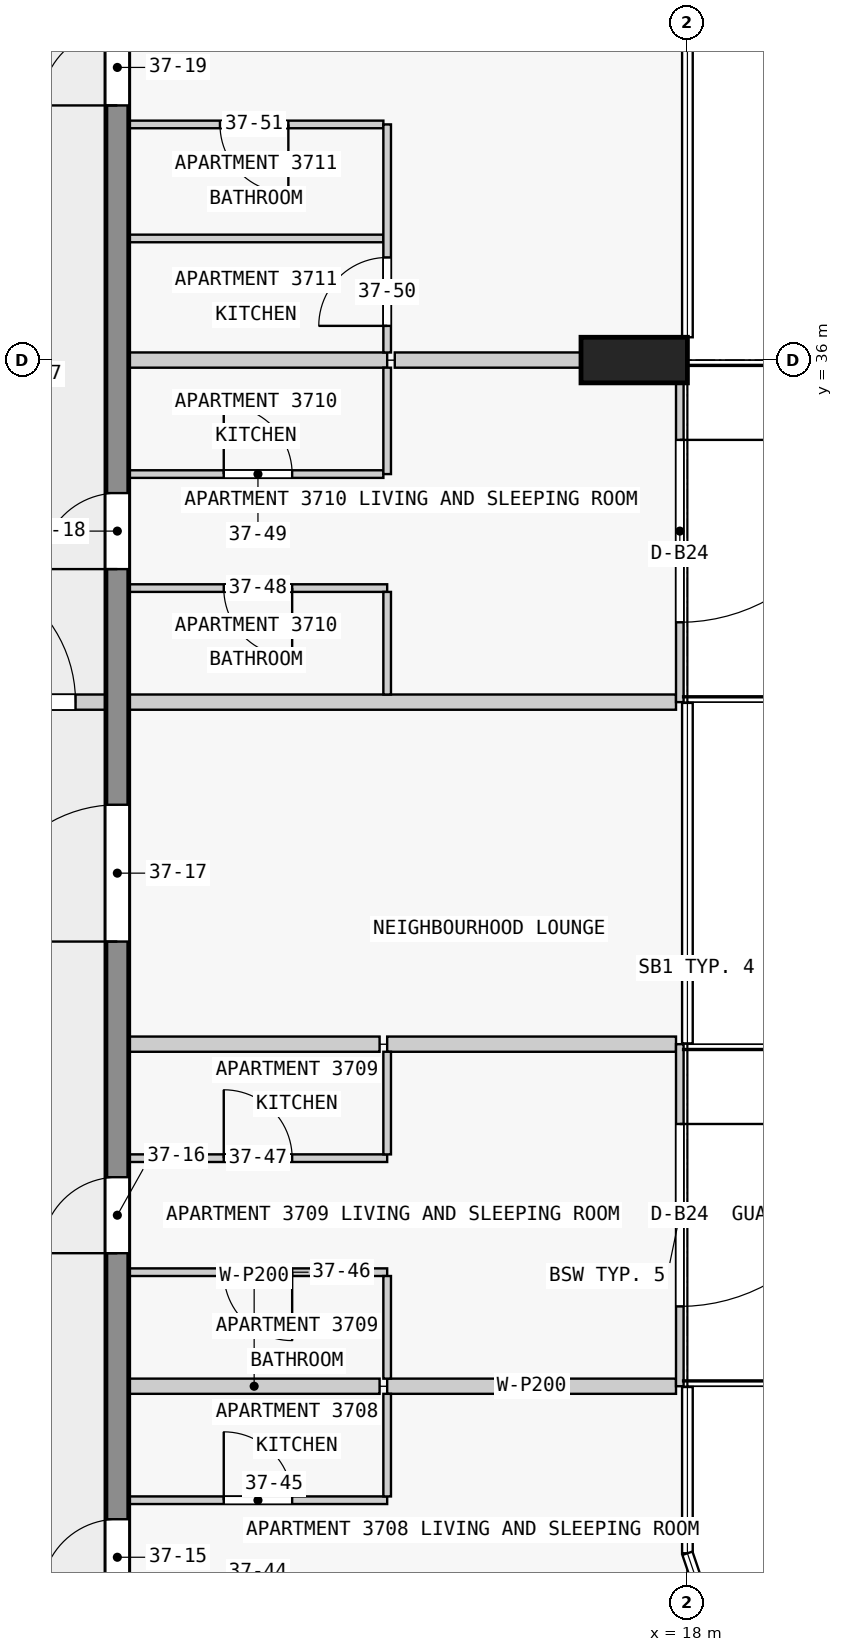
"""IFC4 building model, lengths in metres.
Left out: names, types, materials, properties, quantities, classifications, styles, units other than length and angle.
Written with IfcOpenShell. Run it as: python <this file> out.ifc"""

import sys

from ifc_helpers import new_model, si_unit, direction, frame, frame_2d, origin, origin_2d, place, context, subcontext, project, spatial, rectangle, extrude, element, fill, save


model = new_model("IFC4")
c1 = context("Model", 3, precision=1e-05, world=origin(), true_north=direction((0.0, 1.0)))
c2 = subcontext(c1, "Body", "Model", "MODEL_VIEW")
j1 = project(units=[si_unit("LENGTHUNIT", "METRE"), si_unit("PLANEANGLEUNIT", "RADIAN")], contexts=[c1])
p1 = place(None, origin())
s1 = spatial("IfcSite", under=j1, at=p1, CompositionType="ELEMENT")
p2 = place(p1, origin())
s2 = spatial("IfcBuilding", under=s1, at=p2, CompositionType="ELEMENT")
p3 = place(p2, frame((0.0, 0.0, 146.4)))
s3 = spatial("IfcBuildingStorey", under=s2, at=p3, CompositionType="ELEMENT", Elevation=146.4)
p4 = place(p3, frame((17.3, 36.0, 0.0), z_axis=(0.0, 0.0, 1.0), x_axis=(0.0, 1.0, 0.0)))
e1 = element("IfcColumn", 1, at=p4, inside=s3, PredefinedType="COLUMN", context=c2, shape_type="SweptSolid", body=[
    extrude(rectangle(XDim=0.6, YDim=1.4, at=origin_2d()), origin(), (0.0, 0.0, 1.0), 3.5),
])
p5 = place(p3, frame((10.5, 18.0, 0.0), z_axis=(0.0, 0.0, 1.0), x_axis=(0.0, 1.0, 0.0)))
e2 = element("IfcWall", 2, at=p5, inside=s3, PredefinedType="SHEAR", context=c2, shape_type="SweptSolid", body=[
    extrude(rectangle(XDim=27.0, YDim=0.3, at=frame_2d((13.5, 0.0))), origin(), (0.0, 0.0, 1.0), 3.25),
])
p6 = place(p5, frame((1.75, 0.0, 0.0)))
e3 = element("IfcOpeningElement", 3, at=p6, cuts=e2, PredefinedType="OPENING", context=c2, shape_type="SweptSolid", body=[
    extrude(rectangle(XDim=1.0, YDim=2.1, at=frame_2d((0.5, 1.05))), frame((0.0, 0.16, 0.0), z_axis=(0.0, -1.0, 0.0), x_axis=(1.0, 0.0, 0.0)), (0.0, 0.0, 1.0), 0.32),
])
p7 = place(p5, frame((6.25, 0.0, 0.0)))
e4 = element("IfcOpeningElement", 4, at=p7, cuts=e2, PredefinedType="OPENING", context=c2, shape_type="SweptSolid", body=[
    extrude(rectangle(XDim=1.0, YDim=2.1, at=frame_2d((0.5, 1.05))), frame((0.0, 0.16, 0.0), z_axis=(0.0, -1.0, 0.0), x_axis=(1.0, 0.0, 0.0)), (0.0, 0.0, 1.0), 0.32),
])
p8 = place(p5, frame((10.35, 0.0, 0.0)))
e5 = element("IfcOpeningElement", 5, at=p8, cuts=e2, PredefinedType="OPENING", context=c2, shape_type="SweptSolid", body=[
    extrude(rectangle(XDim=1.8, YDim=2.1, at=frame_2d((0.9, 1.05))), frame((0.0, 0.16, 0.0), z_axis=(0.0, -1.0, 0.0), x_axis=(1.0, 0.0, 0.0)), (0.0, 0.0, 1.0), 0.32),
])
p9 = place(p5, frame((15.25, 0.0, 0.0)))
e6 = element("IfcOpeningElement", 6, at=p9, cuts=e2, PredefinedType="OPENING", context=c2, shape_type="SweptSolid", body=[
    extrude(rectangle(XDim=1.0, YDim=2.1, at=frame_2d((0.5, 1.05))), frame((0.0, 0.16, 0.0), z_axis=(0.0, -1.0, 0.0), x_axis=(1.0, 0.0, 0.0)), (0.0, 0.0, 1.0), 0.32),
])
p10 = place(p5, frame((21.35, 0.0, 0.0)))
e7 = element("IfcOpeningElement", 7, at=p10, cuts=e2, PredefinedType="OPENING", context=c2, shape_type="SweptSolid", body=[
    extrude(rectangle(XDim=1.0, YDim=2.1, at=frame_2d((0.5, 1.05))), frame((0.0, 0.16, 0.0), z_axis=(0.0, -1.0, 0.0), x_axis=(1.0, 0.0, 0.0)), (0.0, 0.0, 1.0), 0.32),
])
p11 = place(p3, frame((17.9, 27.0, 0.0), z_axis=(0.0, 0.0, 1.0), x_axis=(0.0, -1.0, 0.0)))
e8 = element("IfcWall", 8, at=p11, inside=s3, PredefinedType="STANDARD", context=c2, shape_type="SweptSolid", body=[
    extrude(rectangle(XDim=4.5, YDim=0.1, at=frame_2d((2.25, 0.0))), origin(), (0.0, 0.0, 1.0), 3.25),
])
p12 = place(p11, frame((1.05, 0.0, 0.0)))
e9 = element("IfcOpeningElement", 9, at=p12, cuts=e8, PredefinedType="OPENING", context=c2, shape_type="SweptSolid", body=[
    extrude(rectangle(XDim=2.4, YDim=2.4, at=frame_2d((1.2, 1.2))), frame((0.0, 0.06, 0.0), z_axis=(0.0, -1.0, 0.0), x_axis=(1.0, 0.0, 0.0)), (0.0, 0.0, 1.0), 0.12),
])
p13 = place(p3, frame((17.9, 36.0, 0.0), z_axis=(0.0, 0.0, 1.0), x_axis=(0.0, -1.0, 0.0)))
e10 = element("IfcWall", 10, at=p13, inside=s3, PredefinedType="STANDARD", context=c2, shape_type="SweptSolid", body=[
    extrude(rectangle(XDim=4.5, YDim=0.1, at=frame_2d((2.25, 0.0))), origin(), (0.0, 0.0, 1.0), 3.25),
])
p14 = place(p13, frame((1.05, 0.0, 0.0)))
e11 = element("IfcOpeningElement", 11, at=p14, cuts=e10, PredefinedType="OPENING", context=c2, shape_type="SweptSolid", body=[
    extrude(rectangle(XDim=2.4, YDim=2.4, at=frame_2d((1.2, 1.2))), frame((0.0, 0.06, 0.0), z_axis=(0.0, -1.0, 0.0), x_axis=(1.0, 0.0, 0.0)), (0.0, 0.0, 1.0), 0.12),
])
p15 = place(p3, frame((10.65, 21.0, 0.0), z_axis=(0.0, 0.0, 1.0), x_axis=(1.0, 0.0, 0.0)))
e12 = element("IfcWall", 12, at=p15, inside=s3, PredefinedType="PARTITIONING", context=c2, shape_type="SweptSolid", body=[
    extrude(rectangle(XDim=3.4, YDim=0.1, at=frame_2d((1.7, 0.0))), origin(), (0.0, 0.0, 1.0), 3.25),
])
p16 = place(p15, frame((1.25, 0.0, 0.0)))
e13 = element("IfcOpeningElement", 13, at=p16, cuts=e12, PredefinedType="OPENING", context=c2, shape_type="SweptSolid", body=[
    extrude(rectangle(XDim=0.9, YDim=2.1, at=frame_2d((0.45, 1.05))), frame((0.0, 0.06, 0.0), z_axis=(0.0, -1.0, 0.0), x_axis=(1.0, 0.0, 0.0)), (0.0, 0.0, 1.0), 0.12),
])
p17 = place(p3, frame((13.95, 22.5, 0.0), z_axis=(0.0, 0.0, 1.0), x_axis=(-1.0, 0.0, 0.0)))
e14 = element("IfcWall", 14, at=p17, inside=s3, PredefinedType="PARTITIONING", context=c2, shape_type="SweptSolid", body=[
    extrude(rectangle(XDim=3.3, YDim=0.2, at=frame_2d((1.65, 0.0))), origin(), (0.0, 0.0, 1.0), 3.25),
])
p18 = place(p3, frame((14.05, 22.5, 0.0), z_axis=(0.0, 0.0, 1.0), x_axis=(1.0, 0.0, 0.0)))
e15 = element("IfcWall", 15, at=p18, inside=s3, PredefinedType="PARTITIONING", context=c2, shape_type="SweptSolid", body=[
    extrude(rectangle(XDim=3.8, YDim=0.2, at=frame_2d((1.9, 0.0))), origin(), (0.0, 0.0, 1.0), 3.25),
])
p19 = place(p3, frame((14.05, 24.0, 0.0), z_axis=(0.0, 0.0, 1.0), x_axis=(-1.0, 0.0, 0.0)))
e16 = element("IfcWall", 16, at=p19, inside=s3, PredefinedType="PARTITIONING", context=c2, shape_type="SweptSolid", body=[
    extrude(rectangle(XDim=3.4, YDim=0.1, at=frame_2d((1.7, 0.0))), origin(), (0.0, 0.0, 1.0), 3.25),
])
p20 = place(p19, frame((1.25, 0.0, 0.0)))
e17 = element("IfcOpeningElement", 17, at=p20, cuts=e16, PredefinedType="OPENING", context=c2, shape_type="SweptSolid", body=[
    extrude(rectangle(XDim=0.9, YDim=2.1, at=frame_2d((0.45, 1.05))), frame((0.0, 0.06, 0.0), z_axis=(0.0, -1.0, 0.0), x_axis=(1.0, 0.0, 0.0)), (0.0, 0.0, 1.0), 0.12),
])
p21 = place(p3, frame((10.65, 25.5, 0.0), z_axis=(0.0, 0.0, 1.0), x_axis=(1.0, 0.0, 0.0)))
e18 = element("IfcWall", 18, at=p21, inside=s3, PredefinedType="PARTITIONING", context=c2, shape_type="SweptSolid", body=[
    extrude(rectangle(XDim=3.4, YDim=0.1, at=frame_2d((1.7, 0.0))), origin(), (0.0, 0.0, 1.0), 3.25),
])
p22 = place(p21, frame((1.25, 0.0, 0.0)))
e19 = element("IfcOpeningElement", 19, at=p22, cuts=e18, PredefinedType="OPENING", context=c2, shape_type="SweptSolid", body=[
    extrude(rectangle(XDim=0.9, YDim=2.1, at=frame_2d((0.45, 1.05))), frame((0.0, 0.06, 0.0), z_axis=(0.0, -1.0, 0.0), x_axis=(1.0, 0.0, 0.0)), (0.0, 0.0, 1.0), 0.12),
])
p23 = place(p3, frame((13.95, 27.0, 0.0), z_axis=(0.0, 0.0, 1.0), x_axis=(-1.0, 0.0, 0.0)))
e20 = element("IfcWall", 20, at=p23, inside=s3, PredefinedType="PARTITIONING", context=c2, shape_type="SweptSolid", body=[
    extrude(rectangle(XDim=3.3, YDim=0.2, at=frame_2d((1.65, 0.0))), origin(), (0.0, 0.0, 1.0), 3.25),
])
p24 = place(p3, frame((14.05, 27.0, 0.0), z_axis=(0.0, 0.0, 1.0), x_axis=(1.0, 0.0, 0.0)))
e21 = element("IfcWall", 21, at=p24, inside=s3, PredefinedType="PARTITIONING", context=c2, shape_type="SweptSolid", body=[
    extrude(rectangle(XDim=3.8, YDim=0.2, at=frame_2d((1.9, 0.0))), origin(), (0.0, 0.0, 1.0), 3.25),
])
p25 = place(p3, frame((17.85, 31.5, 0.0), z_axis=(0.0, 0.0, 1.0), x_axis=(-1.0, 0.0, 0.0)))
e22 = element("IfcWall", 22, at=p25, inside=s3, PredefinedType="PARTITIONING", context=c2, shape_type="SweptSolid", body=[
    extrude(rectangle(XDim=7.2, YDim=0.2, at=frame_2d((3.6, 0.0))), origin(), (0.0, 0.0, 1.0), 3.25),
])
p26 = place(p3, frame((14.05, 33.0, 0.0), z_axis=(0.0, 0.0, 1.0), x_axis=(-1.0, 0.0, 0.0)))
e23 = element("IfcWall", 23, at=p26, inside=s3, PredefinedType="PARTITIONING", context=c2, shape_type="SweptSolid", body=[
    extrude(rectangle(XDim=3.4, YDim=0.1, at=frame_2d((1.7, 0.0))), origin(), (0.0, 0.0, 1.0), 3.25),
])
p27 = place(p26, frame((1.25, 0.0, 0.0)))
e24 = element("IfcOpeningElement", 24, at=p27, cuts=e23, PredefinedType="OPENING", context=c2, shape_type="SweptSolid", body=[
    extrude(rectangle(XDim=0.9, YDim=2.1, at=frame_2d((0.45, 1.05))), frame((0.0, 0.06, 0.0), z_axis=(0.0, -1.0, 0.0), x_axis=(1.0, 0.0, 0.0)), (0.0, 0.0, 1.0), 0.12),
])
p28 = place(p3, frame((10.65, 34.5, 0.0), z_axis=(0.0, 0.0, 1.0), x_axis=(1.0, 0.0, 0.0)))
e25 = element("IfcWall", 25, at=p28, inside=s3, PredefinedType="PARTITIONING", context=c2, shape_type="SweptSolid", body=[
    extrude(rectangle(XDim=3.35, YDim=0.1, at=frame_2d((1.675, 0.0))), origin(), (0.0, 0.0, 1.0), 3.25),
])
p29 = place(p28, frame((1.25, 0.0, 0.0)))
e26 = element("IfcOpeningElement", 26, at=p29, cuts=e25, PredefinedType="OPENING", context=c2, shape_type="SweptSolid", body=[
    extrude(rectangle(XDim=0.9, YDim=2.1, at=frame_2d((0.45, 1.05))), frame((0.0, 0.06, 0.0), z_axis=(0.0, -1.0, 0.0), x_axis=(1.0, 0.0, 0.0)), (0.0, 0.0, 1.0), 0.12),
])
p30 = place(p3, frame((14.05, 36.0, 0.0), z_axis=(0.0, 0.0, 1.0), x_axis=(-1.0, 0.0, 0.0)))
e27 = element("IfcWall", 27, at=p30, inside=s3, PredefinedType="PARTITIONING", context=c2, shape_type="SweptSolid", body=[
    extrude(rectangle(XDim=3.4, YDim=0.2, at=frame_2d((1.7, 0.0))), origin(), (0.0, 0.0, 1.0), 3.25),
])
p31 = place(p3, frame((14.15, 36.0, 0.0), z_axis=(0.0, 0.0, 1.0), x_axis=(1.0, 0.0, 0.0)))
e28 = element("IfcWall", 28, at=p31, inside=s3, PredefinedType="PARTITIONING", context=c2, shape_type="SweptSolid", body=[
    extrude(rectangle(XDim=2.45, YDim=0.2, at=frame_2d((1.225, 0.0))), origin(), (0.0, 0.0, 1.0), 3.25),
])
p32 = place(p3, frame((14.0, 37.6, 0.0), z_axis=(0.0, 0.0, 1.0), x_axis=(-1.0, 0.0, 0.0)))
e29 = element("IfcWall", 29, at=p32, inside=s3, PredefinedType="PARTITIONING", context=c2, shape_type="SweptSolid", body=[
    extrude(rectangle(XDim=3.35, YDim=0.1, at=frame_2d((1.675, 0.0))), origin(), (0.0, 0.0, 1.0), 3.25),
])
p33 = place(p3, frame((14.0, 39.1, 0.0), z_axis=(0.0, 0.0, 1.0), x_axis=(-1.0, 0.0, 0.0)))
e30 = element("IfcWall", 30, at=p33, inside=s3, PredefinedType="PARTITIONING", context=c2, shape_type="SweptSolid", body=[
    extrude(rectangle(XDim=3.35, YDim=0.1, at=frame_2d((1.675, 0.0))), origin(), (0.0, 0.0, 1.0), 3.25),
])
p34 = place(p33, frame((1.25, 0.0, 0.0)))
e31 = element("IfcOpeningElement", 31, at=p34, cuts=e30, PredefinedType="OPENING", context=c2, shape_type="SweptSolid", body=[
    extrude(rectangle(XDim=0.9, YDim=2.1, at=frame_2d((0.45, 1.05))), frame((0.0, 0.06, 0.0), z_axis=(0.0, -1.0, 0.0), x_axis=(1.0, 0.0, 0.0)), (0.0, 0.0, 1.0), 0.12),
])
for number, where, z_axis, x_axis in (
    (32, (14.05, 21.05, 0.0), (0.0, 0.0, 1.0), (0.0, 1.0, 0.0)),
    (33, (14.05, 22.6, 0.0), (0.0, 0.0, 1.0), (0.0, 1.0, 0.0)),
    (34, (14.05, 25.55, 0.0), (0.0, 0.0, 1.0), (0.0, 1.0, 0.0)),
    (35, (14.05, 31.6, 0.0), (0.0, 0.0, 1.0), (0.0, 1.0, 0.0)),
):
    element("IfcWall", number, at=place(p3, frame(where, z_axis=z_axis, x_axis=x_axis)), inside=s3, PredefinedType="PARTITIONING", context=c2, shape_type="SweptSolid", body=[
        extrude(rectangle(XDim=1.35, YDim=0.1, at=frame_2d((0.675, 0.0))), origin(), (0.0, 0.0, 1.0), 3.25),
    ])
p35 = place(p3, frame((14.05, 34.5, 0.0), z_axis=(0.0, 0.0, 1.0), x_axis=(0.0, 1.0, 0.0)))
e36 = element("IfcWall", 36, at=p35, inside=s3, PredefinedType="PARTITIONING", context=c2, shape_type="SweptSolid", body=[
    extrude(rectangle(XDim=1.4, YDim=0.1, at=frame_2d((0.7, 0.0))), origin(), (0.0, 0.0, 1.0), 3.25),
])
p36 = place(p3, frame((14.05, 36.1, 0.0), z_axis=(0.0, 0.0, 1.0), x_axis=(0.0, 1.0, 0.0)))
e37 = element("IfcWall", 37, at=p36, inside=s3, PredefinedType="PARTITIONING", context=c2, shape_type="SweptSolid", body=[
    extrude(rectangle(XDim=3.0, YDim=0.1, at=frame_2d((1.5, 0.0))), origin(), (0.0, 0.0, 1.0), 3.25),
])
p37 = place(p36, frame((0.35, 0.0, 0.0)))
e38 = element("IfcOpeningElement", 38, at=p37, cuts=e37, PredefinedType="OPENING", context=c2, shape_type="SweptSolid", body=[
    extrude(rectangle(XDim=0.9, YDim=2.1, at=frame_2d((0.45, 1.05))), frame((0.0, 0.06, 0.0), z_axis=(0.0, -1.0, 0.0), x_axis=(1.0, 0.0, 0.0)), (0.0, 0.0, 1.0), 0.12),
])
p38 = place(p3, frame((7.45, 31.5, 0.0), z_axis=(0.0, 0.0, 1.0), x_axis=(1.0, 0.0, 0.0)))
e39 = element("IfcWall", 39, at=p38, inside=s3, PredefinedType="PARTITIONING", context=c2, shape_type="SweptSolid", body=[
    extrude(rectangle(XDim=3.1, YDim=0.2, at=frame_2d((1.55, 0.0))), origin(), (0.0, 0.0, 1.0), 3.25),
])
p39 = place(p38, frame((0.7, 0.0, 0.0)))
e40 = element("IfcOpeningElement", 40, at=p39, cuts=e39, PredefinedType="OPENING", context=c2, shape_type="SweptSolid", body=[
    extrude(rectangle(XDim=1.8, YDim=2.1, at=frame_2d((0.9, 1.05))), frame((0.0, 0.11, 0.0), z_axis=(0.0, -1.0, 0.0), x_axis=(1.0, 0.0, 0.0)), (0.0, 0.0, 1.0), 0.22),
])
p40 = place(p12, origin())
e41 = element("IfcDoor", 41, at=p40, inside=s3, OperationType="SINGLE_SWING_LEFT", PredefinedType="DOOR", context=c2, shape_type="SweptSolid", body=[
    extrude(rectangle(XDim=2.4, YDim=2.4, at=frame_2d((1.2, 1.2))), frame((0.0, 0.025, 0.0), z_axis=(0.0, -1.0, 0.0), x_axis=(1.0, 0.0, 0.0)), (0.0, 0.0, 1.0), 0.05),
])
fill(e9, e41)
p41 = place(p14, origin())
e42 = element("IfcDoor", 42, at=p41, inside=s3, OperationType="SINGLE_SWING_LEFT", PredefinedType="DOOR", context=c2, shape_type="SweptSolid", body=[
    extrude(rectangle(XDim=2.4, YDim=2.4, at=frame_2d((1.2, 1.2))), frame((0.0, 0.025, 0.0), z_axis=(0.0, -1.0, 0.0), x_axis=(1.0, 0.0, 0.0)), (0.0, 0.0, 1.0), 0.05),
])
fill(e11, e42)
p42 = place(p6, origin())
e43 = element("IfcDoor", 43, at=p42, inside=s3, OperationType="SINGLE_SWING_LEFT", PredefinedType="DOOR", context=c2, shape_type="SweptSolid", body=[
    extrude(rectangle(XDim=1.0, YDim=2.1, at=frame_2d((0.5, 1.05))), frame((0.0, 0.025, 0.0), z_axis=(0.0, -1.0, 0.0), x_axis=(1.0, 0.0, 0.0)), (0.0, 0.0, 1.0), 0.05),
])
fill(e3, e43)
p43 = place(p7, origin())
e44 = element("IfcDoor", 44, at=p43, inside=s3, OperationType="SINGLE_SWING_LEFT", PredefinedType="DOOR", context=c2, shape_type="SweptSolid", body=[
    extrude(rectangle(XDim=1.0, YDim=2.1, at=frame_2d((0.5, 1.05))), frame((0.0, 0.025, 0.0), z_axis=(0.0, -1.0, 0.0), x_axis=(1.0, 0.0, 0.0)), (0.0, 0.0, 1.0), 0.05),
])
fill(e4, e44)
p44 = place(p8, origin())
e45 = element("IfcDoor", 45, at=p44, inside=s3, OperationType="SINGLE_SWING_LEFT", PredefinedType="DOOR", context=c2, shape_type="SweptSolid", body=[
    extrude(rectangle(XDim=1.8, YDim=2.1, at=frame_2d((0.9, 1.05))), frame((0.0, 0.025, 0.0), z_axis=(0.0, -1.0, 0.0), x_axis=(1.0, 0.0, 0.0)), (0.0, 0.0, 1.0), 0.05),
])
fill(e5, e45)
p45 = place(p9, origin())
e46 = element("IfcDoor", 46, at=p45, inside=s3, OperationType="SINGLE_SWING_RIGHT", PredefinedType="DOOR", context=c2, shape_type="SweptSolid", body=[
    extrude(rectangle(XDim=1.0, YDim=2.1, at=frame_2d((0.5, 1.05))), frame((0.0, 0.025, 0.0), z_axis=(0.0, -1.0, 0.0), x_axis=(1.0, 0.0, 0.0)), (0.0, 0.0, 1.0), 0.05),
])
fill(e6, e46)
p46 = place(p10, origin())
e47 = element("IfcDoor", 47, at=p46, inside=s3, OperationType="SINGLE_SWING_RIGHT", PredefinedType="DOOR", context=c2, shape_type="SweptSolid", body=[
    extrude(rectangle(XDim=1.0, YDim=2.1, at=frame_2d((0.5, 1.05))), frame((0.0, 0.025, 0.0), z_axis=(0.0, -1.0, 0.0), x_axis=(1.0, 0.0, 0.0)), (0.0, 0.0, 1.0), 0.05),
])
fill(e7, e47)
p47 = place(p39, origin())
e48 = element("IfcDoor", 48, at=p47, inside=s3, OperationType="SINGLE_SWING_RIGHT", PredefinedType="DOOR", context=c2, shape_type="SweptSolid", body=[
    extrude(rectangle(XDim=1.8, YDim=2.1, at=frame_2d((0.9, 1.05))), frame((0.0, 0.025, 0.0), z_axis=(0.0, -1.0, 0.0), x_axis=(1.0, 0.0, 0.0)), (0.0, 0.0, 1.0), 0.05),
])
fill(e40, e48)
p48 = place(p16, origin())
e49 = element("IfcDoor", 49, at=p48, inside=s3, OperationType="SINGLE_SWING_LEFT", PredefinedType="DOOR", context=c2, shape_type="SweptSolid", body=[
    extrude(rectangle(XDim=0.9, YDim=2.1, at=frame_2d((0.45, 1.05))), frame((0.0, 0.025, 0.0), z_axis=(0.0, -1.0, 0.0), x_axis=(1.0, 0.0, 0.0)), (0.0, 0.0, 1.0), 0.05),
])
fill(e13, e49)
p49 = place(p20, origin())
e50 = element("IfcDoor", 50, at=p49, inside=s3, OperationType="SINGLE_SWING_LEFT", PredefinedType="DOOR", context=c2, shape_type="SweptSolid", body=[
    extrude(rectangle(XDim=0.9, YDim=2.1, at=frame_2d((0.45, 1.05))), frame((0.0, 0.025, 0.0), z_axis=(0.0, -1.0, 0.0), x_axis=(1.0, 0.0, 0.0)), (0.0, 0.0, 1.0), 0.05),
])
fill(e17, e50)
p50 = place(p22, origin())
e51 = element("IfcDoor", 51, at=p50, inside=s3, OperationType="SINGLE_SWING_LEFT", PredefinedType="DOOR", context=c2, shape_type="SweptSolid", body=[
    extrude(rectangle(XDim=0.9, YDim=2.1, at=frame_2d((0.45, 1.05))), frame((0.0, 0.025, 0.0), z_axis=(0.0, -1.0, 0.0), x_axis=(1.0, 0.0, 0.0)), (0.0, 0.0, 1.0), 0.05),
])
fill(e19, e51)
p51 = place(p27, origin())
e52 = element("IfcDoor", 52, at=p51, inside=s3, OperationType="SINGLE_SWING_LEFT", PredefinedType="DOOR", context=c2, shape_type="SweptSolid", body=[
    extrude(rectangle(XDim=0.9, YDim=2.1, at=frame_2d((0.45, 1.05))), frame((0.0, 0.025, 0.0), z_axis=(0.0, -1.0, 0.0), x_axis=(1.0, 0.0, 0.0)), (0.0, 0.0, 1.0), 0.05),
])
fill(e24, e52)
p52 = place(p29, origin())
e53 = element("IfcDoor", 53, at=p52, inside=s3, OperationType="SINGLE_SWING_RIGHT", PredefinedType="DOOR", context=c2, shape_type="SweptSolid", body=[
    extrude(rectangle(XDim=0.9, YDim=2.1, at=frame_2d((0.45, 1.05))), frame((0.0, 0.025, 0.0), z_axis=(0.0, -1.0, 0.0), x_axis=(1.0, 0.0, 0.0)), (0.0, 0.0, 1.0), 0.05),
])
fill(e26, e53)
p53 = place(p37, origin())
e54 = element("IfcDoor", 54, at=p53, inside=s3, OperationType="SINGLE_SWING_LEFT", PredefinedType="DOOR", context=c2, shape_type="SweptSolid", body=[
    extrude(rectangle(XDim=0.9, YDim=2.1, at=frame_2d((0.45, 1.05))), frame((0.0, 0.025, 0.0), z_axis=(0.0, -1.0, 0.0), x_axis=(1.0, 0.0, 0.0)), (0.0, 0.0, 1.0), 0.05),
])
fill(e38, e54)
p54 = place(p34, origin())
e55 = element("IfcDoor", 55, at=p54, inside=s3, OperationType="SINGLE_SWING_RIGHT", PredefinedType="DOOR", context=c2, shape_type="SweptSolid", body=[
    extrude(rectangle(XDim=0.9, YDim=2.1, at=frame_2d((0.45, 1.05))), frame((0.0, 0.025, 0.0), z_axis=(0.0, -1.0, 0.0), x_axis=(1.0, 0.0, 0.0)), (0.0, 0.0, 1.0), 0.05),
])
fill(e31, e55)
save(model, sys.argv[1])
